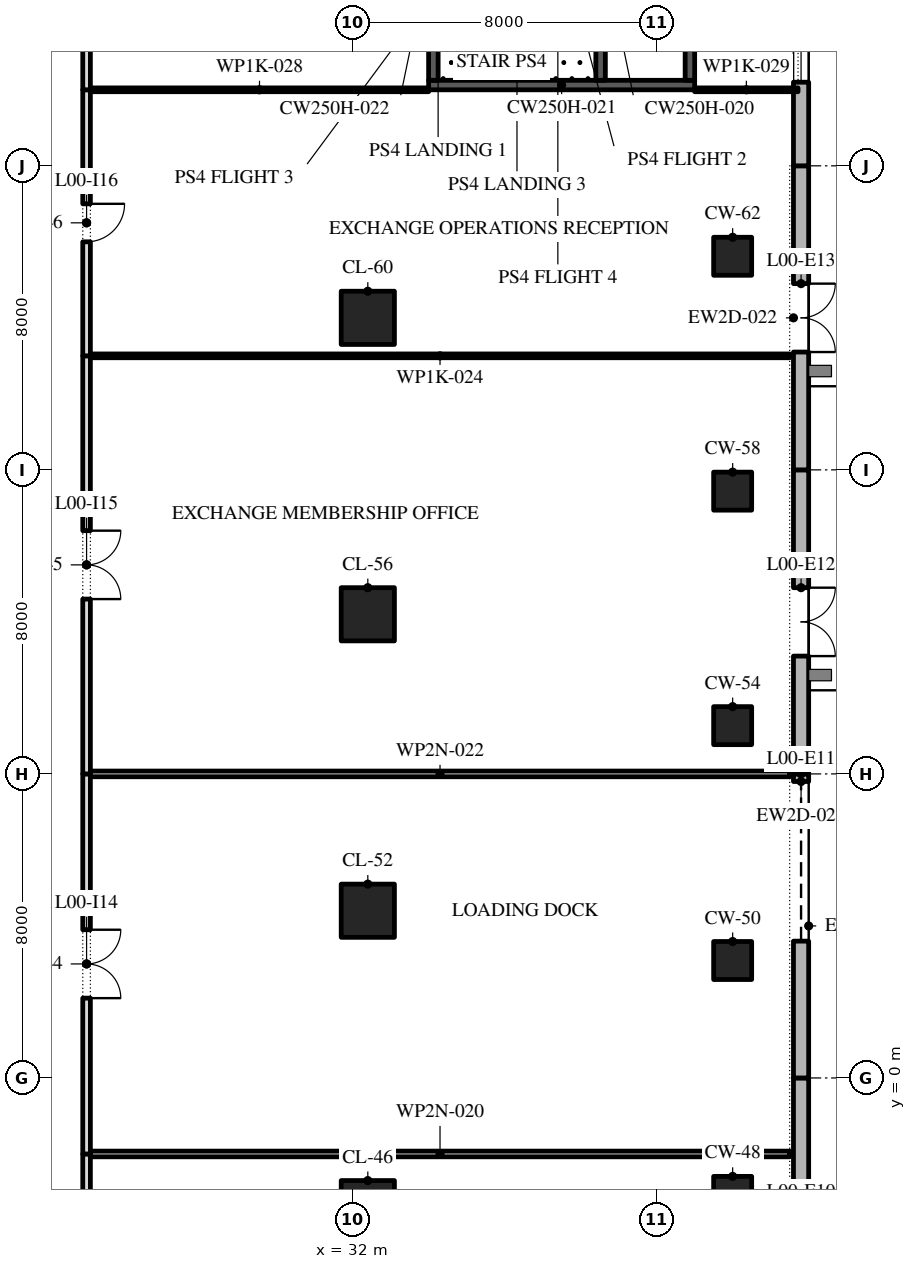
"""IFC4 building model, lengths in metres.
Left out: names, types, materials, properties, quantities, classifications, styles, units other than length and angle.
Written with IfcOpenShell. Run it as: python <this file> out.ifc"""

import sys

from ifc_helpers import new_model, si_unit, direction, frame, frame_2d, origin, origin_2d, place, context, subcontext, project, spatial, polyline, rectangle, outline, extrude, element, fill, save


model = new_model("IFC4")
c1 = context("Model", 3, precision=1e-05, world=origin(), true_north=direction((0.0, 1.0)))
c2 = subcontext(c1, "Body", "Model", "MODEL_VIEW")
j1 = project(units=[si_unit("LENGTHUNIT", "METRE"), si_unit("PLANEANGLEUNIT", "RADIAN")], contexts=[c1])
p1 = place(None, origin())
s1 = spatial("IfcSite", under=j1, at=p1, CompositionType="ELEMENT")
p2 = place(p1, origin())
s2 = spatial("IfcBuilding", under=s1, at=p2, CompositionType="ELEMENT")
p3 = place(p2, origin())
s3 = spatial("IfcBuildingStorey", under=s2, at=p3, CompositionType="ELEMENT", Elevation=0.0)
p4 = place(p3, frame((32.4, -3.4, 0.0), z_axis=(0.0, 0.0, 1.0), x_axis=(1.0, 0.0, 0.0)))
e1 = element("IfcColumn", 1, at=p4, inside=s3, PredefinedType="COLUMN", context=c2, shape_type="SweptSolid", body=[
    extrude(rectangle(XDim=1.4, YDim=1.4, at=origin_2d()), origin(), (0.0, 0.0, 1.0), 8.0),
])
for number, where, z_axis, x_axis in (
    (2, (42.0, -3.09, 0.0), (0.0, 0.0, 1.0), (1.0, 0.0, 0.0)),
    (3, (42.0, 3.09, 0.0), (0.0, 0.0, 1.0), (1.0, 0.0, 0.0)),
):
    element("IfcColumn", number, at=place(p3, frame(where, z_axis=z_axis, x_axis=x_axis)), inside=s3, PredefinedType="COLUMN", context=c2, shape_type="SweptSolid", body=[
        extrude(rectangle(XDim=1.0, YDim=1.0, at=origin_2d()), origin(), (0.0, 0.0, 1.0), 8.0),
    ])
p5 = place(p3, frame((32.4, 4.4, 0.0), z_axis=(0.0, 0.0, 1.0), x_axis=(1.0, 0.0, 0.0)))
e4 = element("IfcColumn", 4, at=p5, inside=s3, PredefinedType="COLUMN", context=c2, shape_type="SweptSolid", body=[
    extrude(rectangle(XDim=1.4, YDim=1.4, at=origin_2d()), origin(), (0.0, 0.0, 1.0), 8.0),
])
p6 = place(p3, frame((42.0, 9.27, 0.0), z_axis=(0.0, 0.0, 1.0), x_axis=(1.0, 0.0, 0.0)))
e5 = element("IfcColumn", 5, at=p6, inside=s3, PredefinedType="COLUMN", context=c2, shape_type="SweptSolid", body=[
    extrude(rectangle(XDim=1.0, YDim=1.0, at=origin_2d()), origin(), (0.0, 0.0, 1.0), 8.0),
])
p7 = place(p3, frame((32.4, 12.2, 0.0), z_axis=(0.0, 0.0, 1.0), x_axis=(1.0, 0.0, 0.0)))
e6 = element("IfcColumn", 6, at=p7, inside=s3, PredefinedType="COLUMN", context=c2, shape_type="SweptSolid", body=[
    extrude(rectangle(XDim=1.4, YDim=1.4, at=origin_2d()), origin(), (0.0, 0.0, 1.0), 8.0),
])
p8 = place(p3, frame((42.0, 15.44, 0.0), z_axis=(0.0, 0.0, 1.0), x_axis=(1.0, 0.0, 0.0)))
e7 = element("IfcColumn", 7, at=p8, inside=s3, PredefinedType="COLUMN", context=c2, shape_type="SweptSolid", body=[
    extrude(rectangle(XDim=1.0, YDim=1.0, at=origin_2d()), origin(), (0.0, 0.0, 1.0), 8.0),
])
p9 = place(p3, frame((32.4, 20.0, 0.0), z_axis=(0.0, 0.0, 1.0), x_axis=(1.0, 0.0, 0.0)))
e8 = element("IfcColumn", 8, at=p9, inside=s3, PredefinedType="COLUMN", context=c2, shape_type="SweptSolid", body=[
    extrude(rectangle(XDim=1.4, YDim=1.4, at=origin_2d()), origin(), (0.0, 0.0, 1.0), 8.0),
])
p10 = place(p3, frame((42.0, 21.62, 0.0), z_axis=(0.0, 0.0, 1.0), x_axis=(1.0, 0.0, 0.0)))
e9 = element("IfcColumn", 9, at=p10, inside=s3, PredefinedType="COLUMN", context=c2, shape_type="SweptSolid", body=[
    extrude(rectangle(XDim=1.0, YDim=1.0, at=origin_2d()), origin(), (0.0, 0.0, 1.0), 8.0),
])
p11 = place(p3, frame((43.8, -8.0, 0.0), z_axis=(0.0, 0.0, 1.0), x_axis=(0.0, 1.0, 0.0)))
e10 = element("IfcWall", 10, at=p11, inside=s3, PredefinedType="STANDARD", context=c2, shape_type="SweptSolid", body=[
    extrude(rectangle(XDim=8.0, YDim=0.4, at=frame_2d((4.0, 0.0))), origin(), (0.0, 0.0, 1.0), 7.7),
])
p12 = place(p11, frame((3.0, 0.0, 0.0)))
e11 = element("IfcOpeningElement", 11, at=p12, cuts=e10, PredefinedType="OPENING", context=c2, shape_type="SweptSolid", body=[
    extrude(rectangle(XDim=1.4, YDim=2.7, at=frame_2d((0.7, 1.35))), frame((0.0, 0.21, 0.0), z_axis=(0.0, -1.0, 0.0), x_axis=(1.0, 0.0, 0.0)), (0.0, 0.0, 1.0), 0.42),
])
p13 = place(p3, frame((43.8, 0.0, 0.0), z_axis=(0.0, 0.0, 1.0), x_axis=(0.0, 1.0, 0.0)))
e12 = element("IfcWall", 12, at=p13, inside=s3, PredefinedType="STANDARD", context=c2, shape_type="SweptSolid", body=[
    extrude(rectangle(XDim=8.0, YDim=0.4, at=frame_2d((4.0, 0.0))), origin(), (0.0, 0.0, 1.0), 7.7),
])
p14 = place(p13, frame((3.6, 0.0, 0.0)))
e13 = element("IfcOpeningElement", 13, at=p14, cuts=e12, PredefinedType="OPENING", context=c2, shape_type="SweptSolid", body=[
    extrude(rectangle(XDim=4.2, YDim=4.5, at=frame_2d((2.1, 2.25))), frame((0.0, 0.21, 0.0), z_axis=(0.0, -1.0, 0.0), x_axis=(1.0, 0.0, 0.0)), (0.0, 0.0, 1.0), 0.42),
])
p15 = place(p3, frame((43.8, 8.0, 0.0), z_axis=(0.0, 0.0, 1.0), x_axis=(0.0, 1.0, 0.0)))
e14 = element("IfcWall", 14, at=p15, inside=s3, PredefinedType="STANDARD", context=c2, shape_type="SweptSolid", body=[
    extrude(rectangle(XDim=8.0, YDim=0.4, at=frame_2d((4.0, 0.0))), origin(), (0.0, 0.0, 1.0), 7.7),
])
p16 = place(p15, frame((3.1, 0.0, 0.0)))
e15 = element("IfcOpeningElement", 15, at=p16, cuts=e14, PredefinedType="OPENING", context=c2, shape_type="SweptSolid", body=[
    extrude(rectangle(XDim=1.8, YDim=2.7, at=frame_2d((0.9, 1.35))), frame((0.0, 0.21, 0.0), z_axis=(0.0, -1.0, 0.0), x_axis=(1.0, 0.0, 0.0)), (0.0, 0.0, 1.0), 0.42),
])
p17 = place(p3, frame((43.8, 16.0, 0.0), z_axis=(0.0, 0.0, 1.0), x_axis=(0.0, 1.0, 0.0)))
e16 = element("IfcWall", 16, at=p17, inside=s3, PredefinedType="STANDARD", context=c2, shape_type="SweptSolid", body=[
    extrude(rectangle(XDim=8.0, YDim=0.4, at=frame_2d((4.0, 0.0))), origin(), (0.0, 0.0, 1.0), 7.7),
])
p18 = place(p17, frame((3.1, 0.0, 0.0)))
e17 = element("IfcOpeningElement", 17, at=p18, cuts=e16, PredefinedType="OPENING", context=c2, shape_type="SweptSolid", body=[
    extrude(rectangle(XDim=1.8, YDim=2.7, at=frame_2d((0.9, 1.35))), frame((0.0, 0.21, 0.0), z_axis=(0.0, -1.0, 0.0), x_axis=(1.0, 0.0, 0.0)), (0.0, 0.0, 1.0), 0.42),
])
p19 = place(p3, frame((43.8, 24.0, 0.0), z_axis=(0.0, 0.0, 1.0), x_axis=(0.0, 1.0, 0.0)))
e18 = element("IfcWall", 18, at=p19, inside=s3, PredefinedType="STANDARD", context=c2, shape_type="SweptSolid", body=[
    extrude(rectangle(XDim=8.0, YDim=0.4, at=frame_2d((4.0, 0.0))), origin(), (0.0, 0.0, 1.0), 7.7),
])
p20 = place(p19, frame((2.2, 0.0, 0.5)))
e19 = element("IfcOpeningElement", 19, at=p20, cuts=e18, PredefinedType="OPENING", context=c2, shape_type="SweptSolid", body=[
    extrude(outline(polyline([(0.0, 0.0), (5.0, 0.0), (5.0, 3.35), (4.955, 3.907), (4.822, 4.451), (4.604, 4.966), (4.306, 5.44), (3.937, 5.86), (3.505, 6.216), (3.022, 6.498), (2.5, 6.7), (1.978, 6.498), (1.495, 6.216), (1.063, 5.86), (0.694, 5.44), (0.396, 4.966), (0.178, 4.451), (0.045, 3.907), (0.0, 3.35), (0.0, 0.0)])), frame((0.0, 0.21, 0.0), z_axis=(0.0, -1.0, 0.0), x_axis=(1.0, 0.0, 0.0)), (0.0, 0.0, 1.0), 0.42),
])
p21 = place(p3, frame((34.0, 26.125, 0.0), z_axis=(0.0, 0.0, 1.0), x_axis=(1.0, 0.0, 0.0)))
e20 = element("IfcWall", 20, at=p21, inside=s3, PredefinedType="SHEAR", context=c2, shape_type="SweptSolid", body=[
    extrude(rectangle(XDim=7.0, YDim=0.25, at=frame_2d((3.5, 0.0))), origin(), (0.0, 0.0, 1.0), 7.7),
])
p22 = place(p3, frame((34.125, 26.25, 0.0), z_axis=(0.0, 0.0, 1.0), x_axis=(0.0, 1.0, 0.0)))
e21 = element("IfcWall", 21, at=p22, inside=s3, PredefinedType="SHEAR", context=c2, shape_type="SweptSolid", body=[
    extrude(rectangle(XDim=7.5, YDim=0.25, at=frame_2d((3.75, 0.0))), origin(), (0.0, 0.0, 1.0), 7.7),
])
p23 = place(p22, frame((5.7, 0.0, 0.0)))
e22 = element("IfcOpeningElement", 22, at=p23, cuts=e21, PredefinedType="OPENING", context=c2, shape_type="SweptSolid", body=[
    extrude(rectangle(XDim=1.2, YDim=2.1, at=frame_2d((0.6, 1.05))), frame((0.0, 0.135, 0.0), z_axis=(0.0, -1.0, 0.0), x_axis=(1.0, 0.0, 0.0)), (0.0, 0.0, 1.0), 0.27),
])
p24 = place(p3, frame((40.875, 26.25, 0.0), z_axis=(0.0, 0.0, 1.0), x_axis=(0.0, 1.0, 0.0)))
e23 = element("IfcWall", 23, at=p24, inside=s3, PredefinedType="SHEAR", context=c2, shape_type="SweptSolid", body=[
    extrude(rectangle(XDim=7.5, YDim=0.25, at=frame_2d((3.75, 0.0))), origin(), (0.0, 0.0, 1.0), 7.7),
])
p25 = place(p24, frame((4.25, 0.0, 0.0)))
e24 = element("IfcOpeningElement", 24, at=p25, cuts=e23, PredefinedType="OPENING", context=c2, shape_type="SweptSolid", body=[
    extrude(rectangle(XDim=0.9, YDim=2.1, at=frame_2d((0.45, 1.05))), frame((0.0, 0.135, 0.0), z_axis=(0.0, -1.0, 0.0), x_axis=(1.0, 0.0, 0.0)), (0.0, 0.0, 1.0), 0.27),
])
p26 = place(p3, frame((38.525, 26.25, 0.0), z_axis=(0.0, 0.0, 1.0), x_axis=(0.0, 1.0, 0.0)))
e25 = element("IfcWall", 25, at=p26, inside=s3, PredefinedType="SHEAR", context=c2, shape_type="SweptSolid", body=[
    extrude(rectangle(XDim=7.5, YDim=0.25, at=frame_2d((3.75, 0.0))), origin(), (0.0, 0.0, 1.0), 7.7),
])
for number, where, z_axis, x_axis in (
    (26, (25.1, -2.0, 0.0), (0.0, 0.0, 1.0), (1.0, 0.0, 0.0)),
    (27, (25.1, 8.0, 0.0), (0.0, 0.0, 1.0), (1.0, 0.0, 0.0)),
):
    element("IfcWall", number, at=place(p3, frame(where, z_axis=z_axis, x_axis=x_axis)), inside=s3, PredefinedType="PARTITIONING", context=c2, shape_type="SweptSolid", body=[
        extrude(rectangle(XDim=18.4, YDim=0.15, at=frame_2d((9.2, 0.0))), origin(), (0.0, 0.0, 1.0), 7.7),
    ])
p27 = place(p3, frame((25.1, 19.0, 0.0), z_axis=(0.0, 0.0, 1.0), x_axis=(1.0, 0.0, 0.0)))
e28 = element("IfcWall", 28, at=p27, inside=s3, PredefinedType="PARTITIONING", context=c2, shape_type="SweptSolid", body=[
    extrude(rectangle(XDim=18.4, YDim=0.1, at=frame_2d((9.2, 0.0))), origin(), (0.0, 0.0, 1.0), 7.7),
])
p28 = place(p3, frame((25.1, 26.0, 0.0), z_axis=(0.0, 0.0, 1.0), x_axis=(1.0, 0.0, 0.0)))
e29 = element("IfcWall", 29, at=p28, inside=s3, PredefinedType="PARTITIONING", context=c2, shape_type="SweptSolid", body=[
    extrude(rectangle(XDim=8.9, YDim=0.1, at=frame_2d((4.45, 0.0))), origin(), (0.0, 0.0, 1.0), 7.7),
])
p29 = place(p3, frame((41.0, 26.0, 0.0), z_axis=(0.0, 0.0, 1.0), x_axis=(1.0, 0.0, 0.0)))
e30 = element("IfcWall", 30, at=p29, inside=s3, PredefinedType="PARTITIONING", context=c2, shape_type="SweptSolid", body=[
    extrude(rectangle(XDim=2.72, YDim=0.1, at=frame_2d((1.36, 0.0))), origin(), (0.0, 0.0, 1.0), 7.7),
])
p30 = place(p3, frame((25.0, -14.5, 0.0), z_axis=(0.0, 0.0, 1.0), x_axis=(0.0, 1.0, 0.0)))
e31 = element("IfcWall", 31, at=p30, inside=s3, PredefinedType="PARTITIONING", context=c2, shape_type="SweptSolid", body=[
    extrude(rectangle(XDim=12.5, YDim=0.2, at=frame_2d((6.25, 0.0))), origin(), (0.0, 0.0, 1.0), 7.7),
])
p31 = place(p30, frame((5.35, 0.0, 0.0)))
e32 = element("IfcOpeningElement", 32, at=p31, cuts=e31, PredefinedType="OPENING", context=c2, shape_type="SweptSolid", body=[
    extrude(rectangle(XDim=1.8, YDim=2.1, at=frame_2d((0.9, 1.05))), frame((0.0, 0.11, 0.0), z_axis=(0.0, -1.0, 0.0), x_axis=(1.0, 0.0, 0.0)), (0.0, 0.0, 1.0), 0.22),
])
p32 = place(p3, frame((25.0, -2.0, 0.0), z_axis=(0.0, 0.0, 1.0), x_axis=(0.0, 1.0, 0.0)))
e33 = element("IfcWall", 33, at=p32, inside=s3, PredefinedType="PARTITIONING", context=c2, shape_type="SweptSolid", body=[
    extrude(rectangle(XDim=10.0, YDim=0.2, at=frame_2d((5.0, 0.0))), origin(), (0.0, 0.0, 1.0), 7.7),
])
p33 = place(p32, frame((4.1, 0.0, 0.0)))
e34 = element("IfcOpeningElement", 34, at=p33, cuts=e33, PredefinedType="OPENING", context=c2, shape_type="SweptSolid", body=[
    extrude(rectangle(XDim=1.8, YDim=2.1, at=frame_2d((0.9, 1.05))), frame((0.0, 0.11, 0.0), z_axis=(0.0, -1.0, 0.0), x_axis=(1.0, 0.0, 0.0)), (0.0, 0.0, 1.0), 0.22),
])
p34 = place(p3, frame((25.0, 8.0, 0.0), z_axis=(0.0, 0.0, 1.0), x_axis=(0.0, 1.0, 0.0)))
e35 = element("IfcWall", 35, at=p34, inside=s3, PredefinedType="PARTITIONING", context=c2, shape_type="SweptSolid", body=[
    extrude(rectangle(XDim=11.0, YDim=0.2, at=frame_2d((5.5, 0.0))), origin(), (0.0, 0.0, 1.0), 7.7),
])
p35 = place(p34, frame((4.6, 0.0, 0.0)))
e36 = element("IfcOpeningElement", 36, at=p35, cuts=e35, PredefinedType="OPENING", context=c2, shape_type="SweptSolid", body=[
    extrude(rectangle(XDim=1.8, YDim=2.1, at=frame_2d((0.9, 1.05))), frame((0.0, 0.11, 0.0), z_axis=(0.0, -1.0, 0.0), x_axis=(1.0, 0.0, 0.0)), (0.0, 0.0, 1.0), 0.22),
])
p36 = place(p3, frame((25.0, 19.0, 0.0), z_axis=(0.0, 0.0, 1.0), x_axis=(0.0, 1.0, 0.0)))
e37 = element("IfcWall", 37, at=p36, inside=s3, PredefinedType="PARTITIONING", context=c2, shape_type="SweptSolid", body=[
    extrude(rectangle(XDim=7.0, YDim=0.2, at=frame_2d((3.5, 0.0))), origin(), (0.0, 0.0, 1.0), 7.7),
])
p37 = place(p36, frame((3.0, 0.0, 0.0)))
e38 = element("IfcOpeningElement", 38, at=p37, cuts=e37, PredefinedType="OPENING", context=c2, shape_type="SweptSolid", body=[
    extrude(rectangle(XDim=1.0, YDim=2.1, at=frame_2d((0.5, 1.05))), frame((0.0, 0.11, 0.0), z_axis=(0.0, -1.0, 0.0), x_axis=(1.0, 0.0, 0.0)), (0.0, 0.0, 1.0), 0.22),
])
p38 = place(p3, frame((25.0, 26.0, 0.0), z_axis=(0.0, 0.0, 1.0), x_axis=(0.0, 1.0, 0.0)))
e39 = element("IfcWall", 39, at=p38, inside=s3, PredefinedType="PARTITIONING", context=c2, shape_type="SweptSolid", body=[
    extrude(rectangle(XDim=9.72, YDim=0.2, at=frame_2d((4.86, 0.0))), origin(), (0.0, 0.0, 1.0), 7.7),
])
p39 = place(p38, frame((4.36, 0.0, 0.0)))
e40 = element("IfcOpeningElement", 40, at=p39, cuts=e39, PredefinedType="OPENING", context=c2, shape_type="SweptSolid", body=[
    extrude(rectangle(XDim=1.0, YDim=2.1, at=frame_2d((0.5, 1.05))), frame((0.0, 0.11, 0.0), z_axis=(0.0, -1.0, 0.0), x_axis=(1.0, 0.0, 0.0)), (0.0, 0.0, 1.0), 0.22),
])
p40 = place(p14, origin())
e41 = element("IfcDoor", 41, at=p40, inside=s3, OperationType="ROLLINGUP", PredefinedType="GATE", context=c2, shape_type="SweptSolid", body=[
    extrude(rectangle(XDim=4.2, YDim=4.5, at=frame_2d((2.1, 2.25))), frame((0.0, 0.025, 0.0), z_axis=(0.0, -1.0, 0.0), x_axis=(1.0, 0.0, 0.0)), (0.0, 0.0, 1.0), 0.05),
])
fill(e13, e41)
p41 = place(p16, frame((1.8, 0.0, 0.0), z_axis=(0.0, 0.0, 1.0), x_axis=(-1.0, 0.0, 0.0)))
e42 = element("IfcDoor", 42, at=p41, inside=s3, OperationType="DOUBLE_DOOR_SINGLE_SWING", PredefinedType="DOOR", context=c2, shape_type="SweptSolid", body=[
    extrude(rectangle(XDim=1.8, YDim=2.7, at=frame_2d((0.9, 1.35))), frame((0.0, 0.025, 0.0), z_axis=(0.0, -1.0, 0.0), x_axis=(1.0, 0.0, 0.0)), (0.0, 0.0, 1.0), 0.05),
])
fill(e15, e42)
p42 = place(p18, frame((1.8, 0.0, 0.0), z_axis=(0.0, 0.0, 1.0), x_axis=(-1.0, 0.0, 0.0)))
e43 = element("IfcDoor", 43, at=p42, inside=s3, OperationType="DOUBLE_DOOR_SINGLE_SWING", PredefinedType="DOOR", context=c2, shape_type="SweptSolid", body=[
    extrude(rectangle(XDim=1.8, YDim=2.7, at=frame_2d((0.9, 1.35))), frame((0.0, 0.025, 0.0), z_axis=(0.0, -1.0, 0.0), x_axis=(1.0, 0.0, 0.0)), (0.0, 0.0, 1.0), 0.05),
])
fill(e17, e43)
p43 = place(p20, origin())
e44 = element("IfcWindow", 44, at=p43, inside=s3, PartitioningType="DOUBLE_PANEL_VERTICAL", PredefinedType="WINDOW", context=c2, shape_type="SweptSolid", body=[
    extrude(outline(polyline([(0.0, 0.0), (5.0, 0.0), (5.0, 3.35), (4.955, 3.907), (4.822, 4.451), (4.604, 4.966), (4.306, 5.44), (3.937, 5.86), (3.505, 6.216), (3.022, 6.498), (2.5, 6.7), (1.978, 6.498), (1.495, 6.216), (1.063, 5.86), (0.694, 5.44), (0.396, 4.966), (0.178, 4.451), (0.045, 3.907), (0.0, 3.35), (0.0, 0.0)])), frame((0.0, 0.03, 0.0), z_axis=(0.0, -1.0, 0.0), x_axis=(1.0, 0.0, 0.0)), (0.0, 0.0, 1.0), 0.06),
])
fill(e19, e44)
p44 = place(p33, frame((1.8, 0.0, 0.0), z_axis=(0.0, 0.0, 1.0), x_axis=(-1.0, 0.0, 0.0)))
e45 = element("IfcDoor", 45, at=p44, inside=s3, OperationType="SINGLE_SWING_RIGHT", PredefinedType="DOOR", context=c2, shape_type="SweptSolid", body=[
    extrude(rectangle(XDim=1.8, YDim=2.1, at=frame_2d((0.9, 1.05))), frame((0.0, 0.025, 0.0), z_axis=(0.0, -1.0, 0.0), x_axis=(1.0, 0.0, 0.0)), (0.0, 0.0, 1.0), 0.05),
])
fill(e34, e45)
p45 = place(p35, frame((1.8, 0.0, 0.0), z_axis=(0.0, 0.0, 1.0), x_axis=(-1.0, 0.0, 0.0)))
e46 = element("IfcDoor", 46, at=p45, inside=s3, OperationType="SINGLE_SWING_RIGHT", PredefinedType="DOOR", context=c2, shape_type="SweptSolid", body=[
    extrude(rectangle(XDim=1.8, YDim=2.1, at=frame_2d((0.9, 1.05))), frame((0.0, 0.025, 0.0), z_axis=(0.0, -1.0, 0.0), x_axis=(1.0, 0.0, 0.0)), (0.0, 0.0, 1.0), 0.05),
])
fill(e36, e46)
p46 = place(p37, frame((1.0, 0.0, 0.0), z_axis=(0.0, 0.0, 1.0), x_axis=(-1.0, 0.0, 0.0)))
e47 = element("IfcDoor", 47, at=p46, inside=s3, OperationType="SINGLE_SWING_RIGHT", PredefinedType="DOOR", context=c2, shape_type="SweptSolid", body=[
    extrude(rectangle(XDim=1.0, YDim=2.1, at=frame_2d((0.5, 1.05))), frame((0.0, 0.025, 0.0), z_axis=(0.0, -1.0, 0.0), x_axis=(1.0, 0.0, 0.0)), (0.0, 0.0, 1.0), 0.05),
])
fill(e38, e47)
save(model, sys.argv[1])
